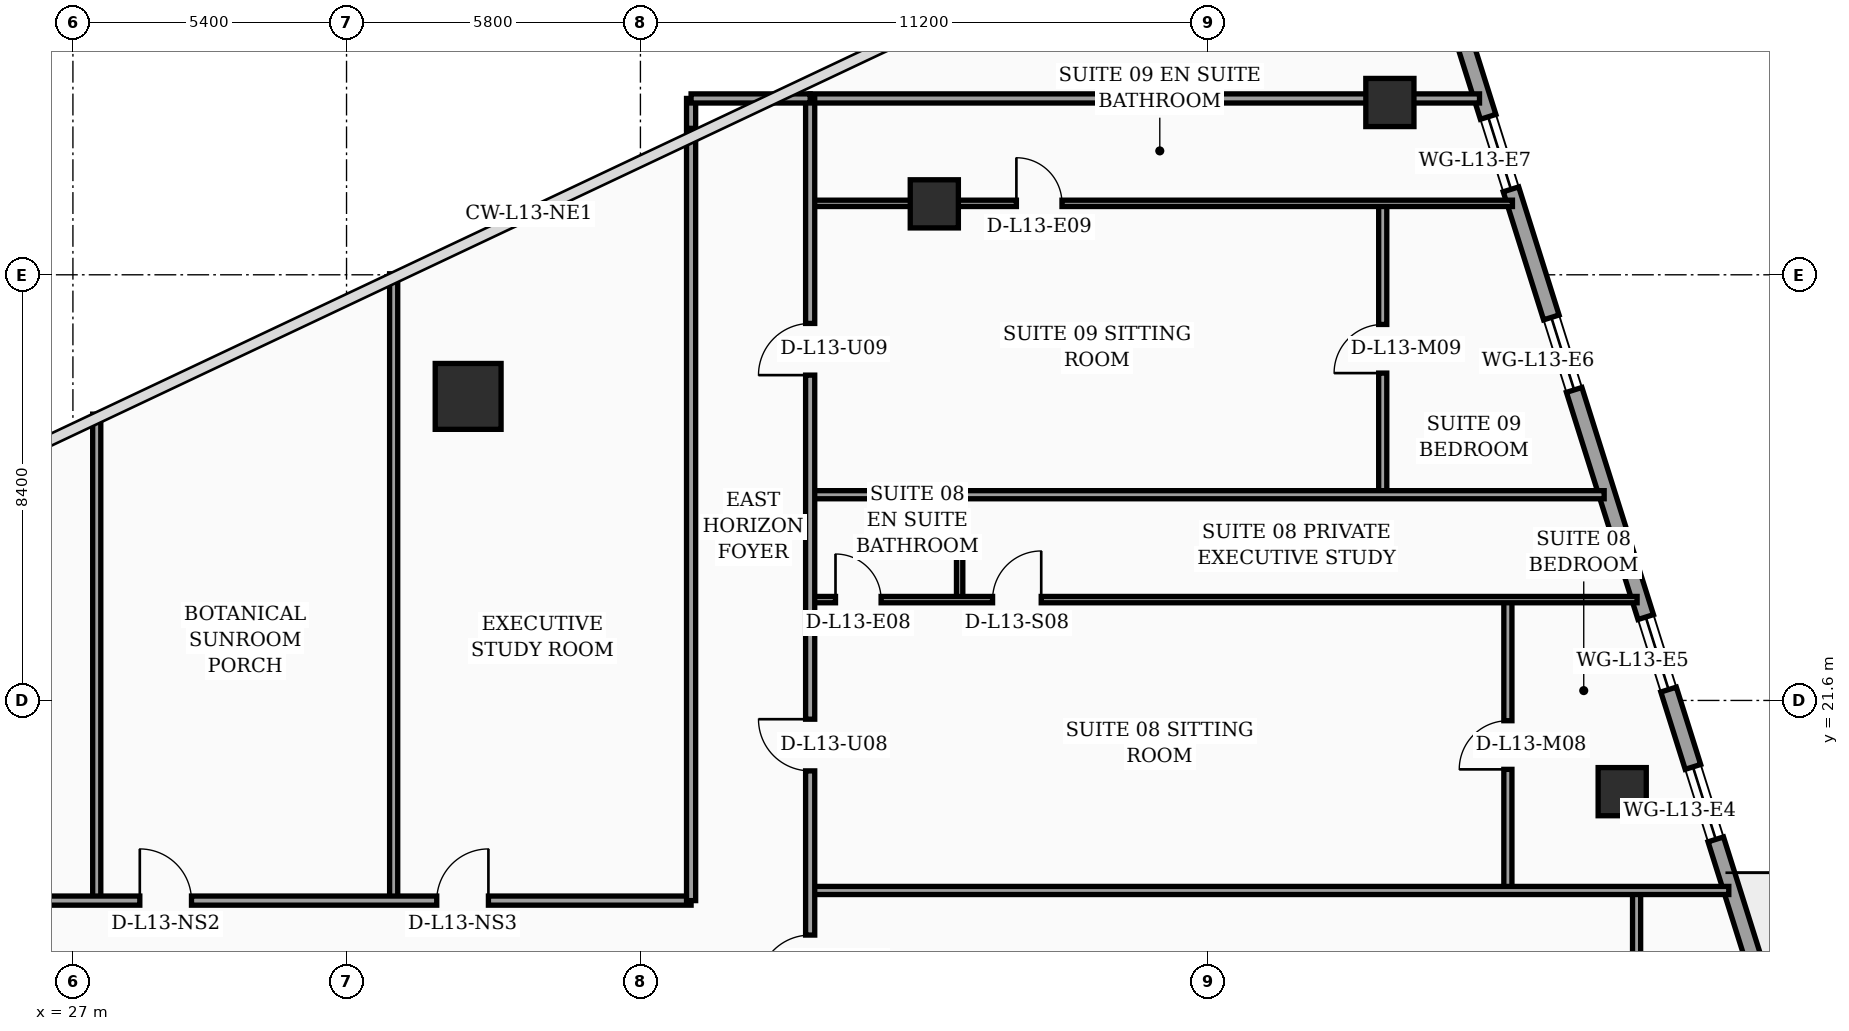
"""IFC4 building model, lengths in metres.
Left out: names, types, materials, properties, quantities, classifications, styles, units other than length and angle.
Written with IfcOpenShell. Run it as: python <this file> out.ifc"""

import sys

from ifc_helpers import new_model, si_unit, direction, frame, frame_2d, origin, origin_2d, place, context, subcontext, project, spatial, rectangle, hollow_rectangle, circle, extrude, element, fill, save


model = new_model("IFC4")
c1 = context("Model", 3, precision=1e-05, world=origin(), true_north=direction((0.0, 1.0)))
c2 = subcontext(c1, "Body", "Model", "MODEL_VIEW")
j1 = project(units=[si_unit("LENGTHUNIT", "METRE"), si_unit("PLANEANGLEUNIT", "RADIAN")], contexts=[c1])
p1 = place(None, origin())
s1 = spatial("IfcSite", under=j1, at=p1, CompositionType="ELEMENT")
p2 = place(p1, origin())
s2 = spatial("IfcBuilding", under=s1, at=p2, CompositionType="ELEMENT")
p3 = place(p2, frame((0.0, 0.0, 58.4)))
s3 = spatial("IfcBuildingStorey", under=s2, at=p3, CompositionType="ELEMENT", Elevation=58.4)
p4 = place(p3, frame((34.8, 27.6, 0.0), z_axis=(0.0, 0.0, 1.0), x_axis=(1.0, 0.0, 0.0)))
e1 = element("IfcColumn", 1, at=p4, inside=s3, PredefinedType="COLUMN", context=c2, shape_type="SweptSolid", body=[
    extrude(circle(Radius=0.65, at=origin_2d()), origin(), (0.0, 0.0, 1.0), 3.56),
])
for number, where, z_axis, x_axis in (
    (2, (44.0, 31.4, 0.0), (0.0, 0.0, 1.0), (1.0, 0.0, 0.0)),
    (3, (57.576, 19.8, 0.0), (0.0, 0.0, 1.0), (1.0, 0.0, 0.0)),
    (4, (52.991, 33.4, 0.0), (0.0, 0.0, 1.0), (1.0, 0.0, 0.0)),
):
    element("IfcColumn", number, at=place(p3, frame(where, z_axis=z_axis, x_axis=x_axis)), inside=s3, PredefinedType="COLUMN", context=c2, shape_type="SweptSolid", body=[
        extrude(hollow_rectangle(XDim=0.95, YDim=0.95, WallThickness=0.04, at=origin_2d()), origin(), (0.0, 0.0, 1.0), 3.56),
    ])
p5 = place(p3, frame((63.63, 5.505, 0.0), z_axis=(0.0, 0.0, 1.0), x_axis=(-0.300501856448, 0.953781229775, 0.0)))
e5 = element("IfcWall", 5, at=p5, inside=s3, PredefinedType="SOLIDWALL", context=c2, shape_type="SweptSolid", body=[
    extrude(rectangle(XDim=30.814, YDim=0.32, at=frame_2d((15.407, 0.0))), origin(), (0.0, 0.0, 1.0), 3.56),
])
p6 = place(p5, frame((10.199, 0.0, 0.0)))
e6 = element("IfcOpeningElement", 6, at=p6, cuts=e5, PredefinedType="OPENING", context=c2, shape_type="SweptSolid", body=[
    extrude(rectangle(XDim=1.4, YDim=2.25, at=frame_2d((0.7, 1.125))), frame((0.0, 0.17, 0.0), z_axis=(0.0, -1.0, 0.0), x_axis=(1.0, 0.0, 0.0)), (0.0, 0.0, 1.0), 0.34),
])
p7 = place(p5, frame((2.65, 0.0, 0.75)))
e7 = element("IfcOpeningElement", 7, at=p7, cuts=e5, PredefinedType="OPENING", context=c2, shape_type="SweptSolid", body=[
    extrude(rectangle(XDim=1.5, YDim=1.6, at=frame_2d((0.75, 0.8))), frame((0.0, 0.17, 0.0), z_axis=(0.0, -1.0, 0.0), x_axis=(1.0, 0.0, 0.0)), (0.0, 0.0, 1.0), 0.34),
])
p8 = place(p5, frame((4.7, 0.0, 0.75)))
e8 = element("IfcOpeningElement", 8, at=p8, cuts=e5, PredefinedType="OPENING", context=c2, shape_type="SweptSolid", body=[
    extrude(rectangle(XDim=1.5, YDim=1.6, at=frame_2d((0.75, 0.8))), frame((0.0, 0.17, 0.0), z_axis=(0.0, -1.0, 0.0), x_axis=(1.0, 0.0, 0.0)), (0.0, 0.0, 1.0), 0.34),
])
p9 = place(p5, frame((7.8, 0.0, 0.75)))
e9 = element("IfcOpeningElement", 9, at=p9, cuts=e5, PredefinedType="OPENING", context=c2, shape_type="SweptSolid", body=[
    extrude(rectangle(XDim=1.5, YDim=1.6, at=frame_2d((0.75, 0.8))), frame((0.0, 0.17, 0.0), z_axis=(0.0, -1.0, 0.0), x_axis=(1.0, 0.0, 0.0)), (0.0, 0.0, 1.0), 0.34),
])
p10 = place(p5, frame((14.0, 0.0, 0.75)))
e10 = element("IfcOpeningElement", 10, at=p10, cuts=e5, PredefinedType="OPENING", context=c2, shape_type="SweptSolid", body=[
    extrude(rectangle(XDim=1.5, YDim=1.6, at=frame_2d((0.75, 0.8))), frame((0.0, 0.17, 0.0), z_axis=(0.0, -1.0, 0.0), x_axis=(1.0, 0.0, 0.0)), (0.0, 0.0, 1.0), 0.34),
])
p11 = place(p5, frame((17.1, 0.0, 0.75)))
e11 = element("IfcOpeningElement", 11, at=p11, cuts=e5, PredefinedType="OPENING", context=c2, shape_type="SweptSolid", body=[
    extrude(rectangle(XDim=1.5, YDim=1.6, at=frame_2d((0.75, 0.8))), frame((0.0, 0.17, 0.0), z_axis=(0.0, -1.0, 0.0), x_axis=(1.0, 0.0, 0.0)), (0.0, 0.0, 1.0), 0.34),
])
p12 = place(p5, frame((23.3, 0.0, 0.75)))
e12 = element("IfcOpeningElement", 12, at=p12, cuts=e5, PredefinedType="OPENING", context=c2, shape_type="SweptSolid", body=[
    extrude(rectangle(XDim=1.5, YDim=1.6, at=frame_2d((0.75, 0.8))), frame((0.0, 0.17, 0.0), z_axis=(0.0, -1.0, 0.0), x_axis=(1.0, 0.0, 0.0)), (0.0, 0.0, 1.0), 0.34),
])
p13 = place(p5, frame((27.45, 0.0, 0.75)))
e13 = element("IfcOpeningElement", 13, at=p13, cuts=e5, PredefinedType="OPENING", context=c2, shape_type="SweptSolid", body=[
    extrude(rectangle(XDim=1.5, YDim=1.6, at=frame_2d((0.75, 0.8))), frame((0.0, 0.17, 0.0), z_axis=(0.0, -1.0, 0.0), x_axis=(1.0, 0.0, 0.0)), (0.0, 0.0, 1.0), 0.34),
])
p14 = place(p3, frame((27.47, 17.65, 0.0), z_axis=(0.0, 0.0, 1.0), x_axis=(0.0, 1.0, 0.0)))
e14 = element("IfcWall", 14, at=p14, inside=s3, PredefinedType="PARTITIONING", context=c2, shape_type="SweptSolid", body=[
    extrude(rectangle(XDim=9.6, YDim=0.16, at=frame_2d((4.8, 0.0))), origin(), (0.0, 0.0, 1.0), 2.84),
])
p15 = place(p3, frame((33.33, 17.65, 0.0), z_axis=(0.0, 0.0, 1.0), x_axis=(0.0, 1.0, 0.0)))
e15 = element("IfcWall", 15, at=p15, inside=s3, PredefinedType="PARTITIONING", context=c2, shape_type="SweptSolid", body=[
    extrude(rectangle(XDim=12.37, YDim=0.16, at=frame_2d((6.185, 0.0))), origin(), (0.0, 0.0, 1.0), 2.84),
])
p16 = place(p3, frame((21.5, 17.65, 0.0), z_axis=(0.0, 0.0, 1.0), x_axis=(1.0, 0.0, 0.0)))
e16 = element("IfcWall", 16, at=p16, inside=s3, PredefinedType="PARTITIONING", context=c2, shape_type="SweptSolid", body=[
    extrude(rectangle(XDim=17.7, YDim=0.18, at=frame_2d((8.85, 0.0))), origin(), (0.0, 0.0, 1.0), 2.84),
])
p17 = place(p16, frame((0.95, 0.0, 0.0)))
e17 = element("IfcOpeningElement", 17, at=p17, cuts=e16, PredefinedType="OPENING", context=c2, shape_type="SweptSolid", body=[
    extrude(rectangle(XDim=1.02, YDim=2.2, at=frame_2d((0.51, 1.1))), frame((0.0, 0.1, 0.0), z_axis=(0.0, -1.0, 0.0), x_axis=(1.0, 0.0, 0.0)), (0.0, 0.0, 1.0), 0.2),
])
p18 = place(p16, frame((6.82, 0.0, 0.0)))
e18 = element("IfcOpeningElement", 18, at=p18, cuts=e16, PredefinedType="OPENING", context=c2, shape_type="SweptSolid", body=[
    extrude(rectangle(XDim=1.02, YDim=2.2, at=frame_2d((0.51, 1.1))), frame((0.0, 0.1, 0.0), z_axis=(0.0, -1.0, 0.0), x_axis=(1.0, 0.0, 0.0)), (0.0, 0.0, 1.0), 0.2),
])
p19 = place(p16, frame((12.68, 0.0, 0.0)))
e19 = element("IfcOpeningElement", 19, at=p19, cuts=e16, PredefinedType="OPENING", context=c2, shape_type="SweptSolid", body=[
    extrude(rectangle(XDim=1.02, YDim=2.2, at=frame_2d((0.51, 1.1))), frame((0.0, 0.1, 0.0), z_axis=(0.0, -1.0, 0.0), x_axis=(1.0, 0.0, 0.0)), (0.0, 0.0, 1.0), 0.2),
])
p20 = place(p3, frame((39.2, 17.65, 0.0), z_axis=(0.0, 0.0, 1.0), x_axis=(0.0, 1.0, 0.0)))
e20 = element("IfcWall", 20, at=p20, inside=s3, PredefinedType="PARTITIONING", context=c2, shape_type="SweptSolid", body=[
    extrude(rectangle(XDim=15.14, YDim=0.18, at=frame_2d((7.57, 0.0))), origin(), (0.0, 0.0, 1.0), 2.84),
])
p21 = place(p3, frame((57.86, 7.45, 0.0), z_axis=(0.0, 0.0, 1.0), x_axis=(0.0, 1.0, 0.0)))
e21 = element("IfcWall", 21, at=p21, inside=s3, PredefinedType="PARTITIONING", context=c2, shape_type="SweptSolid", body=[
    extrude(rectangle(XDim=10.4, YDim=0.16, at=frame_2d((5.2, 0.0))), origin(), (0.0, 0.0, 1.0), 3.04),
])
p22 = place(p21, frame((4.72, 0.0, 0.0)))
e22 = element("IfcOpeningElement", 22, at=p22, cuts=e21, PredefinedType="OPENING", context=c2, shape_type="SweptSolid", body=[
    extrude(rectangle(XDim=0.96, YDim=2.2, at=frame_2d((0.48, 1.1))), frame((0.0, 0.09, 0.0), z_axis=(0.0, -1.0, 0.0), x_axis=(1.0, 0.0, 0.0)), (0.0, 0.0, 1.0), 0.18),
])
p23 = place(p3, frame((44.5, 23.59, 0.0), z_axis=(0.0, 0.0, 1.0), x_axis=(0.0, 1.0, 0.0)))
e23 = element("IfcWall", 23, at=p23, inside=s3, PredefinedType="PARTITIONING", context=c2, shape_type="SweptSolid", body=[
    extrude(rectangle(XDim=2.07, YDim=0.125, at=frame_2d((1.035, 0.0))), origin(), (0.0, 0.0, 1.0), 2.84),
])
p24 = place(p3, frame((55.32, 17.85, 0.0), z_axis=(0.0, 0.0, 1.0), x_axis=(0.0, 1.0, 0.0)))
e24 = element("IfcWall", 24, at=p24, inside=s3, PredefinedType="PARTITIONING", context=c2, shape_type="SweptSolid", body=[
    extrude(rectangle(XDim=5.74, YDim=0.16, at=frame_2d((2.87, 0.0))), origin(), (0.0, 0.0, 1.0), 2.84),
])
p25 = place(p24, frame((2.39, 0.0, 0.0)))
e25 = element("IfcOpeningElement", 25, at=p25, cuts=e24, PredefinedType="OPENING", context=c2, shape_type="SweptSolid", body=[
    extrude(rectangle(XDim=0.96, YDim=2.2, at=frame_2d((0.48, 1.1))), frame((0.0, 0.09, 0.0), z_axis=(0.0, -1.0, 0.0), x_axis=(1.0, 0.0, 0.0)), (0.0, 0.0, 1.0), 0.18),
])
p26 = place(p3, frame((41.55, 23.59, 0.0), z_axis=(0.0, 0.0, 1.0), x_axis=(1.0, 0.0, 0.0)))
e26 = element("IfcWall", 26, at=p26, inside=s3, PredefinedType="PARTITIONING", context=c2, shape_type="SweptSolid", body=[
    extrude(rectangle(XDim=16.32, YDim=0.125, at=frame_2d((8.16, 0.0))), origin(), (0.0, 0.0, 1.0), 2.84),
])
p27 = place(p26, frame((0.5, 0.0, 0.0)))
e27 = element("IfcOpeningElement", 27, at=p27, cuts=e26, PredefinedType="OPENING", context=c2, shape_type="SweptSolid", body=[
    extrude(rectangle(XDim=0.9, YDim=2.15, at=frame_2d((0.45, 1.075))), frame((0.0, 0.073, 0.0), z_axis=(0.0, -1.0, 0.0), x_axis=(1.0, 0.0, 0.0)), (0.0, 0.0, 1.0), 0.145),
])
p28 = place(p26, frame((3.6, 0.0, 0.0)))
e28 = element("IfcOpeningElement", 28, at=p28, cuts=e26, PredefinedType="OPENING", context=c2, shape_type="SweptSolid", body=[
    extrude(rectangle(XDim=0.96, YDim=2.2, at=frame_2d((0.48, 1.1))), frame((0.0, 0.073, 0.0), z_axis=(0.0, -1.0, 0.0), x_axis=(1.0, 0.0, 0.0)), (0.0, 0.0, 1.0), 0.145),
])
p29 = place(p3, frame((52.85, 25.66, 0.0), z_axis=(0.0, 0.0, 1.0), x_axis=(0.0, 1.0, 0.0)))
e29 = element("IfcWall", 29, at=p29, inside=s3, PredefinedType="PARTITIONING", context=c2, shape_type="SweptSolid", body=[
    extrude(rectangle(XDim=5.75, YDim=0.16, at=frame_2d((2.875, 0.0))), origin(), (0.0, 0.0, 1.0), 3.56),
])
p30 = place(p29, frame((2.4, 0.0, 0.0)))
e30 = element("IfcOpeningElement", 30, at=p30, cuts=e29, PredefinedType="OPENING", context=c2, shape_type="SweptSolid", body=[
    extrude(rectangle(XDim=0.96, YDim=2.2, at=frame_2d((0.48, 1.1))), frame((0.0, 0.09, 0.0), z_axis=(0.0, -1.0, 0.0), x_axis=(1.0, 0.0, 0.0)), (0.0, 0.0, 1.0), 0.18),
])
p31 = place(p3, frame((41.55, 31.41, 0.0), z_axis=(0.0, 0.0, 1.0), x_axis=(1.0, 0.0, 0.0)))
e31 = element("IfcWall", 31, at=p31, inside=s3, PredefinedType="PARTITIONING", context=c2, shape_type="SweptSolid", body=[
    extrude(rectangle(XDim=13.86, YDim=0.125, at=frame_2d((6.93, 0.0))), origin(), (0.0, 0.0, 1.0), 2.84),
])
p32 = place(p31, frame((4.07, 0.0, 0.0)))
e32 = element("IfcOpeningElement", 32, at=p32, cuts=e31, PredefinedType="OPENING", context=c2, shape_type="SweptSolid", body=[
    extrude(rectangle(XDim=0.9, YDim=2.15, at=frame_2d((0.45, 1.075))), frame((0.0, 0.073, 0.0), z_axis=(0.0, -1.0, 0.0), x_axis=(1.0, 0.0, 0.0)), (0.0, 0.0, 1.0), 0.145),
])
p33 = place(p3, frame((41.55, 25.66, 0.0), z_axis=(0.0, 0.0, 1.0), x_axis=(1.0, 0.0, 0.0)))
e33 = element("IfcWall", 33, at=p33, inside=s3, PredefinedType="PARTITIONING", context=c2, shape_type="SweptSolid", body=[
    extrude(rectangle(XDim=15.67, YDim=0.16, at=frame_2d((7.835, 0.0))), origin(), (0.0, 0.0, 1.0), 2.84),
])
p34 = place(p3, frame((41.55, 17.85, 0.0), z_axis=(0.0, 0.0, 1.0), x_axis=(1.0, 0.0, 0.0)))
e34 = element("IfcWall", 34, at=p34, inside=s3, PredefinedType="PARTITIONING", context=c2, shape_type="SweptSolid", body=[
    extrude(rectangle(XDim=18.13, YDim=0.16, at=frame_2d((9.065, 0.0))), origin(), (0.0, 0.0, 1.0), 2.84),
])
p35 = place(p3, frame((41.55, 33.48, 0.0), z_axis=(0.0, 0.0, 1.0), x_axis=(1.0, 0.0, 0.0)))
e35 = element("IfcWall", 35, at=p35, inside=s3, PredefinedType="PARTITIONING", context=c2, shape_type="SweptSolid", body=[
    extrude(rectangle(XDim=13.21, YDim=0.18, at=frame_2d((6.605, 0.0))), origin(), (0.0, 0.0, 1.0), 2.84),
])
p36 = place(p3, frame((41.55, 2.44, 0.0), z_axis=(0.0, 0.0, 1.0), x_axis=(0.0, 1.0, 0.0)))
e36 = element("IfcWall", 36, at=p36, inside=s3, PredefinedType="PARTITIONING", context=c2, shape_type="SweptSolid", body=[
    extrude(rectangle(XDim=31.04, YDim=0.18, at=frame_2d((15.52, 0.0))), origin(), (0.0, 0.0, 1.0), 2.84),
])
p37 = place(p36, frame((13.51, 0.0, 0.0)))
e37 = element("IfcOpeningElement", 37, at=p37, cuts=e36, PredefinedType="OPENING", context=c2, shape_type="SweptSolid", body=[
    extrude(rectangle(XDim=1.02, YDim=2.2, at=frame_2d((0.51, 1.1))), frame((0.0, 0.1, 0.0), z_axis=(0.0, -1.0, 0.0), x_axis=(1.0, 0.0, 0.0)), (0.0, 0.0, 1.0), 0.2),
])
p38 = place(p36, frame((17.77, 0.0, 0.0)))
e38 = element("IfcOpeningElement", 38, at=p38, cuts=e36, PredefinedType="OPENING", context=c2, shape_type="SweptSolid", body=[
    extrude(rectangle(XDim=1.02, YDim=2.2, at=frame_2d((0.51, 1.1))), frame((0.0, 0.1, 0.0), z_axis=(0.0, -1.0, 0.0), x_axis=(1.0, 0.0, 0.0)), (0.0, 0.0, 1.0), 0.2),
])
p39 = place(p36, frame((25.58, 0.0, 0.0)))
e39 = element("IfcOpeningElement", 39, at=p39, cuts=e36, PredefinedType="OPENING", context=c2, shape_type="SweptSolid", body=[
    extrude(rectangle(XDim=1.02, YDim=2.2, at=frame_2d((0.51, 1.1))), frame((0.0, 0.1, 0.0), z_axis=(0.0, -1.0, 0.0), x_axis=(1.0, 0.0, 0.0)), (0.0, 0.0, 1.0), 0.2),
])
p40 = place(p3, frame((39.2, 32.89, 0.0), z_axis=(0.0, 0.0, 1.0), x_axis=(0.0, 1.0, 0.0)))
e40 = element("IfcWall", 40, at=p40, inside=s3, PredefinedType="PARTITIONING", context=c2, shape_type="SweptSolid", body=[
    extrude(rectangle(XDim=0.59, YDim=0.18, at=frame_2d((0.295, 0.0))), origin(), (0.0, 0.0, 1.0), 3.56),
])
p41 = place(p3, frame((39.2, 33.48, 0.0), z_axis=(0.0, 0.0, 1.0), x_axis=(1.0, 0.0, 0.0)))
e41 = element("IfcWall", 41, at=p41, inside=s3, PredefinedType="PARTITIONING", context=c2, shape_type="SweptSolid", body=[
    extrude(rectangle(XDim=2.35, YDim=0.18, at=frame_2d((1.175, 0.0))), origin(), (0.0, 0.0, 1.0), 3.56),
])
p42 = place(p10, origin())
e42 = element("IfcWindow", 42, at=p42, inside=s3, PartitioningType="SINGLE_PANEL", PredefinedType="WINDOW", context=c2, shape_type="SweptSolid", body=[
    extrude(rectangle(XDim=1.5, YDim=1.6, at=frame_2d((0.75, 0.8))), frame((0.0, 0.03, 0.0), z_axis=(0.0, -1.0, 0.0), x_axis=(1.0, 0.0, 0.0)), (0.0, 0.0, 1.0), 0.06),
])
fill(e10, e42)
p43 = place(p11, origin())
e43 = element("IfcWindow", 43, at=p43, inside=s3, PartitioningType="SINGLE_PANEL", PredefinedType="WINDOW", context=c2, shape_type="SweptSolid", body=[
    extrude(rectangle(XDim=1.5, YDim=1.6, at=frame_2d((0.75, 0.8))), frame((0.0, 0.03, 0.0), z_axis=(0.0, -1.0, 0.0), x_axis=(1.0, 0.0, 0.0)), (0.0, 0.0, 1.0), 0.06),
])
fill(e11, e43)
p44 = place(p12, origin())
e44 = element("IfcWindow", 44, at=p44, inside=s3, PartitioningType="SINGLE_PANEL", PredefinedType="WINDOW", context=c2, shape_type="SweptSolid", body=[
    extrude(rectangle(XDim=1.5, YDim=1.6, at=frame_2d((0.75, 0.8))), frame((0.0, 0.03, 0.0), z_axis=(0.0, -1.0, 0.0), x_axis=(1.0, 0.0, 0.0)), (0.0, 0.0, 1.0), 0.06),
])
fill(e12, e44)
p45 = place(p13, origin())
e45 = element("IfcWindow", 45, at=p45, inside=s3, PartitioningType="SINGLE_PANEL", PredefinedType="WINDOW", context=c2, shape_type="SweptSolid", body=[
    extrude(rectangle(XDim=1.5, YDim=1.6, at=frame_2d((0.75, 0.8))), frame((0.0, 0.03, 0.0), z_axis=(0.0, -1.0, 0.0), x_axis=(1.0, 0.0, 0.0)), (0.0, 0.0, 1.0), 0.06),
])
fill(e13, e45)
p46 = place(p18, origin())
e46 = element("IfcDoor", 46, at=p46, inside=s3, OperationType="SINGLE_SWING_LEFT", PredefinedType="DOOR", context=c2, shape_type="SweptSolid", body=[
    extrude(rectangle(XDim=1.02, YDim=2.2, at=frame_2d((0.51, 1.1))), frame((0.0, 0.025, 0.0), z_axis=(0.0, -1.0, 0.0), x_axis=(1.0, 0.0, 0.0)), (0.0, 0.0, 1.0), 0.05),
])
fill(e18, e46)
p47 = place(p19, origin())
e47 = element("IfcDoor", 47, at=p47, inside=s3, OperationType="SINGLE_SWING_RIGHT", PredefinedType="DOOR", context=c2, shape_type="SweptSolid", body=[
    extrude(rectangle(XDim=1.02, YDim=2.2, at=frame_2d((0.51, 1.1))), frame((0.0, 0.025, 0.0), z_axis=(0.0, -1.0, 0.0), x_axis=(1.0, 0.0, 0.0)), (0.0, 0.0, 1.0), 0.05),
])
fill(e19, e47)
p48 = place(p25, origin())
e48 = element("IfcDoor", 48, at=p48, inside=s3, OperationType="SINGLE_SWING_LEFT", PredefinedType="DOOR", context=c2, shape_type="SweptSolid", body=[
    extrude(rectangle(XDim=0.96, YDim=2.2, at=frame_2d((0.48, 1.1))), frame((0.0, 0.025, 0.0), z_axis=(0.0, -1.0, 0.0), x_axis=(1.0, 0.0, 0.0)), (0.0, 0.0, 1.0), 0.05),
])
fill(e25, e48)
p49 = place(p27, origin())
e49 = element("IfcDoor", 49, at=p49, inside=s3, OperationType="SINGLE_SWING_LEFT", PredefinedType="DOOR", context=c2, shape_type="SweptSolid", body=[
    extrude(rectangle(XDim=0.9, YDim=2.15, at=frame_2d((0.45, 1.075))), frame((0.0, 0.025, 0.0), z_axis=(0.0, -1.0, 0.0), x_axis=(1.0, 0.0, 0.0)), (0.0, 0.0, 1.0), 0.05),
])
fill(e27, e49)
p50 = place(p28, origin())
e50 = element("IfcDoor", 50, at=p50, inside=s3, OperationType="SINGLE_SWING_RIGHT", PredefinedType="DOOR", context=c2, shape_type="SweptSolid", body=[
    extrude(rectangle(XDim=0.96, YDim=2.2, at=frame_2d((0.48, 1.1))), frame((0.0, 0.025, 0.0), z_axis=(0.0, -1.0, 0.0), x_axis=(1.0, 0.0, 0.0)), (0.0, 0.0, 1.0), 0.05),
])
fill(e28, e50)
p51 = place(p30, origin())
e51 = element("IfcDoor", 51, at=p51, inside=s3, OperationType="SINGLE_SWING_LEFT", PredefinedType="DOOR", context=c2, shape_type="SweptSolid", body=[
    extrude(rectangle(XDim=0.96, YDim=2.2, at=frame_2d((0.48, 1.1))), frame((0.0, 0.025, 0.0), z_axis=(0.0, -1.0, 0.0), x_axis=(1.0, 0.0, 0.0)), (0.0, 0.0, 1.0), 0.05),
])
fill(e30, e51)
p52 = place(p32, origin())
e52 = element("IfcDoor", 52, at=p52, inside=s3, OperationType="SINGLE_SWING_LEFT", PredefinedType="DOOR", context=c2, shape_type="SweptSolid", body=[
    extrude(rectangle(XDim=0.9, YDim=2.15, at=frame_2d((0.45, 1.075))), frame((0.0, 0.025, 0.0), z_axis=(0.0, -1.0, 0.0), x_axis=(1.0, 0.0, 0.0)), (0.0, 0.0, 1.0), 0.05),
])
fill(e32, e52)
p53 = place(p37, origin())
e53 = element("IfcDoor", 53, at=p53, inside=s3, OperationType="SINGLE_SWING_LEFT", PredefinedType="DOOR", context=c2, shape_type="SweptSolid", body=[
    extrude(rectangle(XDim=1.02, YDim=2.2, at=frame_2d((0.51, 1.1))), frame((0.0, 0.025, 0.0), z_axis=(0.0, -1.0, 0.0), x_axis=(1.0, 0.0, 0.0)), (0.0, 0.0, 1.0), 0.05),
])
fill(e37, e53)
p54 = place(p38, origin())
e54 = element("IfcDoor", 54, at=p54, inside=s3, OperationType="SINGLE_SWING_RIGHT", PredefinedType="DOOR", context=c2, shape_type="SweptSolid", body=[
    extrude(rectangle(XDim=1.02, YDim=2.2, at=frame_2d((0.51, 1.1))), frame((0.0, 0.025, 0.0), z_axis=(0.0, -1.0, 0.0), x_axis=(1.0, 0.0, 0.0)), (0.0, 0.0, 1.0), 0.05),
])
fill(e38, e54)
p55 = place(p39, origin())
e55 = element("IfcDoor", 55, at=p55, inside=s3, OperationType="SINGLE_SWING_LEFT", PredefinedType="DOOR", context=c2, shape_type="SweptSolid", body=[
    extrude(rectangle(XDim=1.02, YDim=2.2, at=frame_2d((0.51, 1.1))), frame((0.0, 0.025, 0.0), z_axis=(0.0, -1.0, 0.0), x_axis=(1.0, 0.0, 0.0)), (0.0, 0.0, 1.0), 0.05),
])
fill(e39, e55)
save(model, sys.argv[1])
